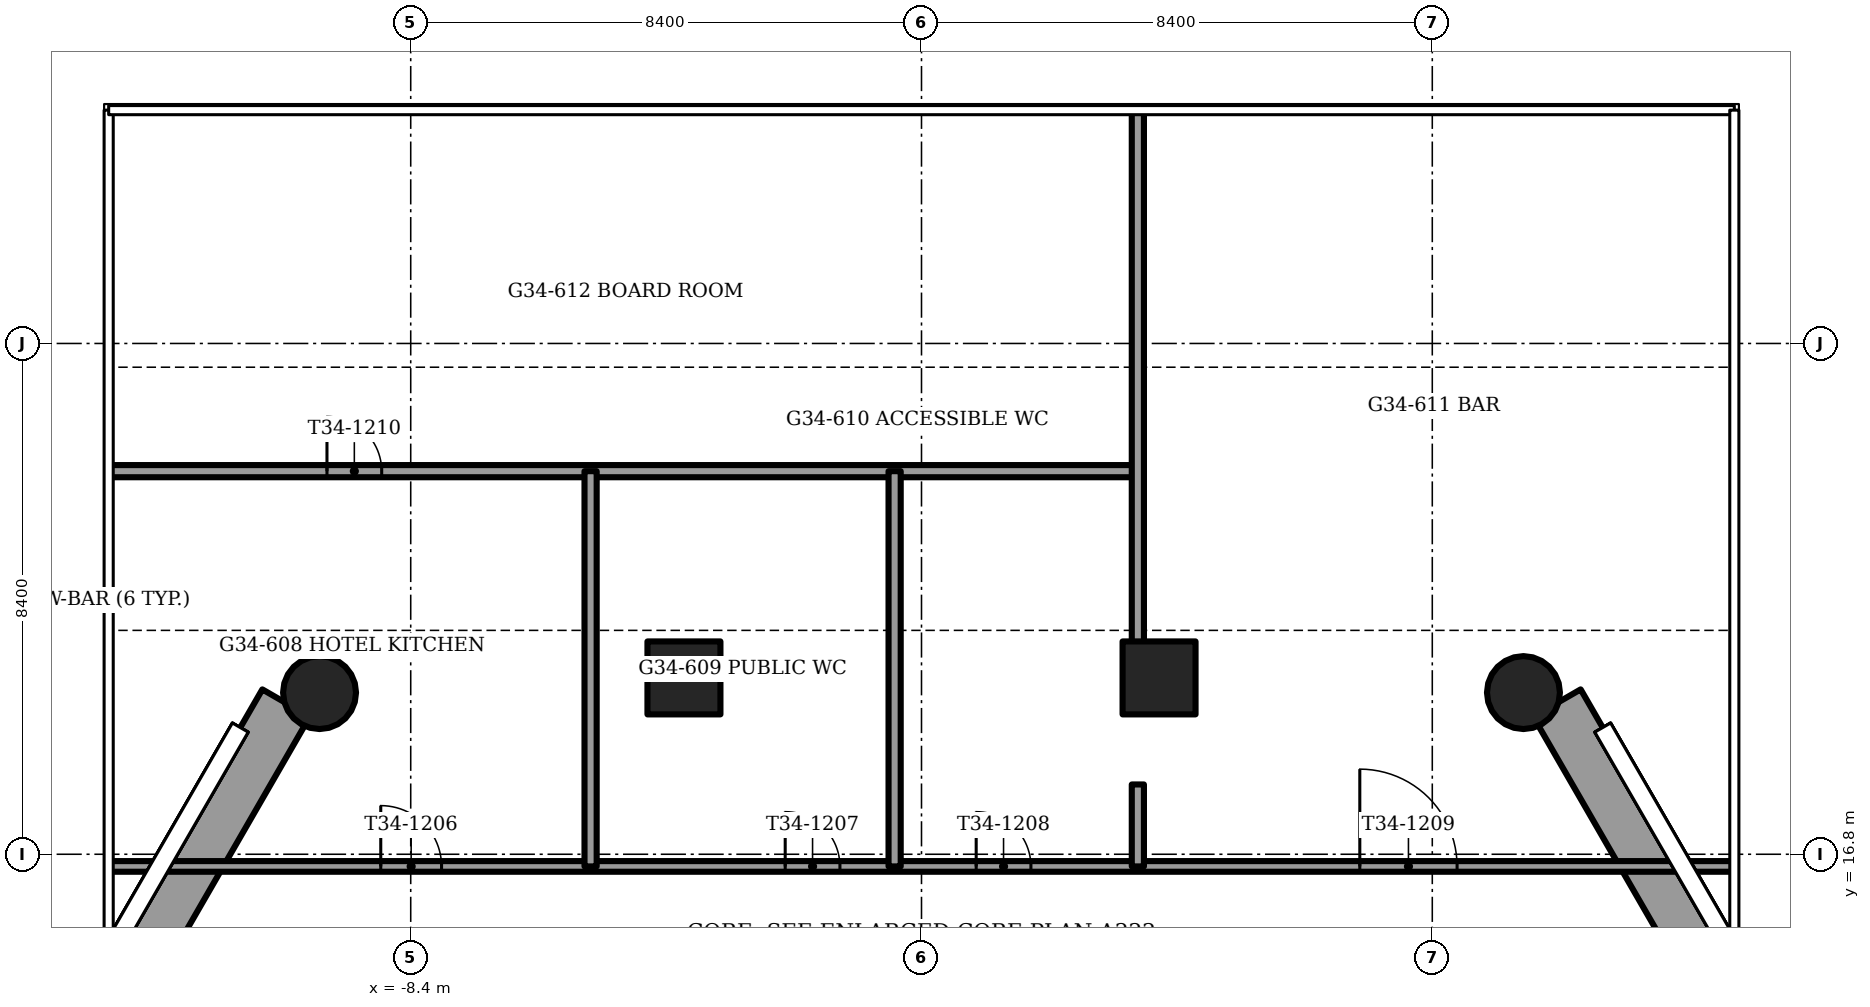
"""IFC4 building model, lengths in metres.
Left out: names, types, materials, properties, quantities, classifications, styles, units other than length and angle.
Written with IfcOpenShell. Run it as: python <this file> out.ifc"""

import sys

from ifc_helpers import new_model, si_unit, direction, frame, frame_2d, origin, origin_2d, place, context, subcontext, project, spatial, rectangle, circle, extrude, element, fill, save


model = new_model("IFC4")
c1 = context("Model", 3, precision=1e-05, world=origin(), true_north=direction((0.0, 1.0)))
c2 = subcontext(c1, "Body", "Model", "MODEL_VIEW")
j1 = project(units=[si_unit("LENGTHUNIT", "METRE"), si_unit("PLANEANGLEUNIT", "RADIAN")], contexts=[c1])
p1 = place(None, origin())
s1 = spatial("IfcSite", under=j1, at=p1, CompositionType="ELEMENT")
p2 = place(p1, origin())
s2 = spatial("IfcBuilding", under=s1, at=p2, CompositionType="ELEMENT")
p3 = place(p2, frame((0.0, 0.0, 138.5)))
s3 = spatial("IfcBuildingStorey", under=s2, at=p3, CompositionType="ELEMENT", Elevation=138.5)
for number, where, z_axis, x_axis in (
    (1, (-9.899, 19.459, -1.2), (0.0, 0.0, 1.0), (1.0, 0.0, 0.0)),
    (2, (9.899, 19.459, -1.2), (0.0, 0.0, 1.0), (1.0, 0.0, 0.0)),
):
    element("IfcColumn", number, at=place(p3, frame(where, z_axis=z_axis, x_axis=x_axis)), inside=s3, PredefinedType="COLUMN", context=c2, shape_type="SweptSolid", body=[
        extrude(circle(Radius=0.6, at=origin_2d()), origin(), (0.0, 0.0, 1.0), 3.75),
    ])
for number, where, z_axis, x_axis in (
    (3, (3.907, 19.7, -1.2), (0.0, 0.0, 1.0), (1.0, 0.0, 0.0)),
    (4, (-3.907, 19.7, -1.2), (0.0, 0.0, 1.0), (1.0, 0.0, 0.0)),
):
    element("IfcColumn", number, at=place(p3, frame(where, z_axis=z_axis, x_axis=x_axis)), inside=s3, PredefinedType="COLUMN", context=c2, shape_type="SweptSolid", body=[
        extrude(rectangle(XDim=1.2, YDim=1.2, at=origin_2d()), origin(), (0.0, 0.0, 1.0), 3.75),
    ])
for number, where, z_axis, x_axis in (
    (5, (-10.45, 19.286, 0.0), (0.0, 0.0, 1.0), (-0.5, -0.866, 0.0)),
    (6, (13.951, 13.224, 0.0), (0.0, 0.0, 1.0), (-0.5, 0.866, 0.0)),
):
    element("IfcWall", number, at=place(p3, frame(where, z_axis=z_axis, x_axis=x_axis)), inside=s3, PredefinedType="PARAPET", context=c2, shape_type="SweptSolid", body=[
        extrude(rectangle(XDim=7.001, YDim=0.9, at=frame_2d((3.5, 0.0))), origin(), (0.0, 0.0, 1.0), 1.1),
    ])
p4 = place(p3, frame((-13.348, 16.6, 0.0), z_axis=(0.0, 0.0, 1.0), x_axis=(1.0, 0.0, 0.0)))
e7 = element("IfcWall", 7, at=p4, inside=s3, PredefinedType="PARTITIONING", context=c2, shape_type="SweptSolid", body=[
    extrude(rectangle(XDim=26.696, YDim=0.175, at=frame_2d((13.348, 0.0))), origin(), (0.0, 0.0, 1.0), 2.25),
])
p5 = place(p4, frame((4.456, 0.0, 0.0)))
e8 = element("IfcOpeningElement", 8, at=p5, cuts=e7, PredefinedType="OPENING", context=c2, shape_type="SweptSolid", body=[
    extrude(rectangle(XDim=1.0, YDim=2.1, at=frame_2d((0.5, 1.05))), frame((0.0, 0.087, 0.0), z_axis=(0.0, -1.0, 0.0), x_axis=(1.0, 0.0, 0.0)), (0.0, 0.0, 1.0), 0.175),
])
p6 = place(p4, frame((11.107, 0.0, 0.0)))
e9 = element("IfcOpeningElement", 9, at=p6, cuts=e7, PredefinedType="OPENING", context=c2, shape_type="SweptSolid", body=[
    extrude(rectangle(XDim=0.9, YDim=2.1, at=frame_2d((0.45, 1.05))), frame((0.0, 0.087, 0.0), z_axis=(0.0, -1.0, 0.0), x_axis=(1.0, 0.0, 0.0)), (0.0, 0.0, 1.0), 0.175),
])
p7 = place(p4, frame((14.248, 0.0, 0.0)))
e10 = element("IfcOpeningElement", 10, at=p7, cuts=e7, PredefinedType="OPENING", context=c2, shape_type="SweptSolid", body=[
    extrude(rectangle(XDim=0.9, YDim=2.1, at=frame_2d((0.45, 1.05))), frame((0.0, 0.087, 0.0), z_axis=(0.0, -1.0, 0.0), x_axis=(1.0, 0.0, 0.0)), (0.0, 0.0, 1.0), 0.175),
])
p8 = place(p4, frame((20.556, 0.0, 0.0)))
e11 = element("IfcOpeningElement", 11, at=p8, cuts=e7, PredefinedType="OPENING", context=c2, shape_type="SweptSolid", body=[
    extrude(rectangle(XDim=1.6, YDim=2.1, at=frame_2d((0.8, 1.05))), frame((0.0, 0.087, 0.0), z_axis=(0.0, -1.0, 0.0), x_axis=(1.0, 0.0, 0.0)), (0.0, 0.0, 1.0), 0.175),
])
p9 = place(p3, frame((-13.348, 23.1, 0.0), z_axis=(0.0, 0.0, 1.0), x_axis=(1.0, 0.0, 0.0)))
e12 = element("IfcWall", 12, at=p9, inside=s3, PredefinedType="PARTITIONING", context=c2, shape_type="SweptSolid", body=[
    extrude(rectangle(XDim=16.906, YDim=0.2, at=frame_2d((8.453, 0.0))), origin(), (0.0, 0.0, 1.0), 3.45),
])
p10 = place(p9, frame((3.571, 0.0, 0.0)))
e13 = element("IfcOpeningElement", 13, at=p10, cuts=e12, PredefinedType="OPENING", context=c2, shape_type="SweptSolid", body=[
    extrude(rectangle(XDim=0.9, YDim=2.1, at=frame_2d((0.45, 1.05))), frame((0.0, 0.1, 0.0), z_axis=(0.0, -1.0, 0.0), x_axis=(1.0, 0.0, 0.0)), (0.0, 0.0, 1.0), 0.2),
])
for number, where, z_axis, x_axis in (
    (14, (-5.442, 16.6, 0.0), (0.0, 0.0, 1.0), (0.0, 1.0, 0.0)),
    (15, (-0.442, 16.6, 0.0), (0.0, 0.0, 1.0), (0.0, 1.0, 0.0)),
):
    element("IfcWall", number, at=place(p3, frame(where, z_axis=z_axis, x_axis=x_axis)), inside=s3, PredefinedType="PARTITIONING", context=c2, shape_type="SweptSolid", body=[
        extrude(rectangle(XDim=6.5, YDim=0.2, at=frame_2d((3.25, 0.0))), origin(), (0.0, 0.0, 1.0), 2.828),
    ])
p11 = place(p3, frame((3.558, 16.6, 0.0), z_axis=(0.0, 0.0, 1.0), x_axis=(0.0, 1.0, 0.0)))
e16 = element("IfcWall", 16, at=p11, inside=s3, PredefinedType="PARTITIONING", context=c2, shape_type="SweptSolid", body=[
    extrude(rectangle(XDim=1.348, YDim=0.2, at=frame_2d((0.674, 0.0))), origin(), (0.0, 0.0, 1.0), 3.45),
])
p12 = place(p3, frame((3.558, 19.139, 0.0), z_axis=(0.0, 0.0, 1.0), x_axis=(0.0, 1.0, 0.0)))
e17 = element("IfcWall", 17, at=p12, inside=s3, PredefinedType="PARTITIONING", context=c2, shape_type="SweptSolid", body=[
    extrude(rectangle(XDim=9.879, YDim=0.2, at=frame_2d((4.939, 0.0))), origin(), (0.0, 0.0, 1.0), 2.828),
])
p13 = place(p5, origin())
e18 = element("IfcDoor", 18, at=p13, inside=s3, OperationType="SINGLE_SWING_RIGHT", PredefinedType="DOOR", context=c2, shape_type="SweptSolid", body=[
    extrude(rectangle(XDim=1.0, YDim=2.1, at=frame_2d((0.5, 1.05))), frame((0.0, 0.025, 0.0), z_axis=(0.0, -1.0, 0.0), x_axis=(1.0, 0.0, 0.0)), (0.0, 0.0, 1.0), 0.05),
])
fill(e8, e18)
p14 = place(p6, origin())
e19 = element("IfcDoor", 19, at=p14, inside=s3, OperationType="SINGLE_SWING_LEFT", PredefinedType="DOOR", context=c2, shape_type="SweptSolid", body=[
    extrude(rectangle(XDim=0.9, YDim=2.1, at=frame_2d((0.45, 1.05))), frame((0.0, 0.025, 0.0), z_axis=(0.0, -1.0, 0.0), x_axis=(1.0, 0.0, 0.0)), (0.0, 0.0, 1.0), 0.05),
])
fill(e9, e19)
p15 = place(p7, origin())
e20 = element("IfcDoor", 20, at=p15, inside=s3, OperationType="SINGLE_SWING_RIGHT", PredefinedType="DOOR", context=c2, shape_type="SweptSolid", body=[
    extrude(rectangle(XDim=0.9, YDim=2.1, at=frame_2d((0.45, 1.05))), frame((0.0, 0.025, 0.0), z_axis=(0.0, -1.0, 0.0), x_axis=(1.0, 0.0, 0.0)), (0.0, 0.0, 1.0), 0.05),
])
fill(e10, e20)
p16 = place(p8, origin())
e21 = element("IfcDoor", 21, at=p16, inside=s3, OperationType="DOUBLE_DOOR_SINGLE_SWING", PredefinedType="DOOR", context=c2, shape_type="SweptSolid", body=[
    extrude(rectangle(XDim=1.6, YDim=2.1, at=frame_2d((0.8, 1.05))), frame((0.0, 0.025, 0.0), z_axis=(0.0, -1.0, 0.0), x_axis=(1.0, 0.0, 0.0)), (0.0, 0.0, 1.0), 0.05),
])
fill(e11, e21)
p17 = place(p10, origin())
e22 = element("IfcDoor", 22, at=p17, inside=s3, OperationType="SINGLE_SWING_RIGHT", PredefinedType="DOOR", context=c2, shape_type="SweptSolid", body=[
    extrude(rectangle(XDim=0.9, YDim=2.1, at=frame_2d((0.45, 1.05))), frame((0.0, 0.025, 0.0), z_axis=(0.0, -1.0, 0.0), x_axis=(1.0, 0.0, 0.0)), (0.0, 0.0, 1.0), 0.05),
])
fill(e13, e22)
save(model, sys.argv[1])
